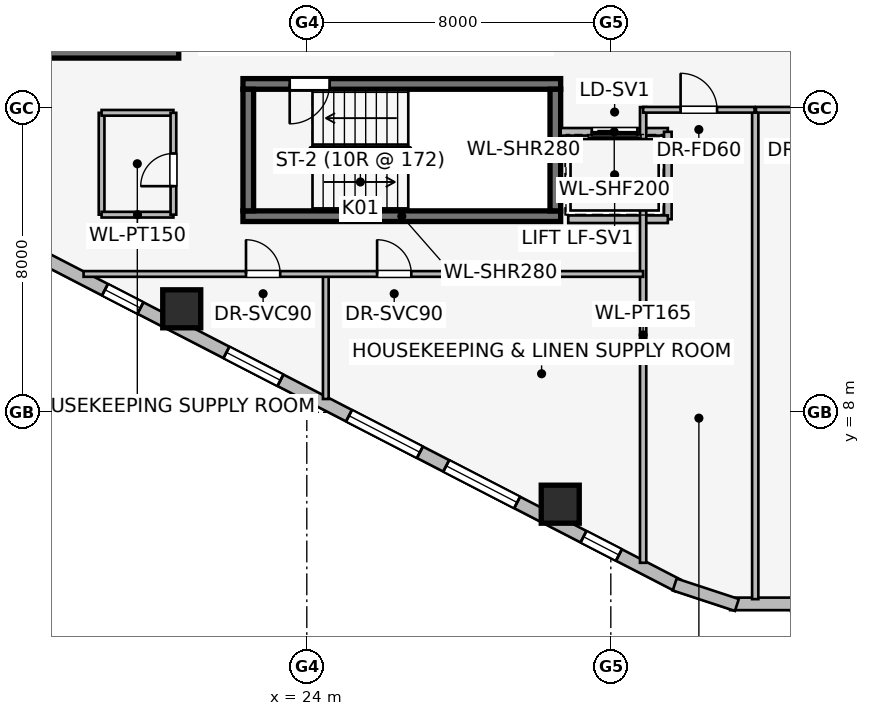
"""IFC4 building model, lengths in metres.
Left out: names, types, materials, properties, quantities, classifications, styles, units other than length and angle.
Written with IfcOpenShell. Run it as: python <this file> out.ifc"""

import sys

from ifc_helpers import new_model, si_unit, direction, frame, frame_2d, origin, origin_2d, place, context, subcontext, project, spatial, rectangle, extrude, element, fill, save


model = new_model("IFC4")
c1 = context("Model", 3, precision=1e-05, world=origin(), true_north=direction((0.0, 1.0)))
c2 = subcontext(c1, "Body", "Model", "MODEL_VIEW")
j1 = project(units=[si_unit("LENGTHUNIT", "METRE"), si_unit("PLANEANGLEUNIT", "RADIAN")], contexts=[c1])
p1 = place(None, origin())
s1 = spatial("IfcSite", under=j1, at=p1, CompositionType="ELEMENT")
p2 = place(p1, origin())
s2 = spatial("IfcBuilding", under=s1, at=p2, CompositionType="ELEMENT")
p3 = place(p2, frame((0.0, 0.0, 142.95)))
s3 = spatial("IfcBuildingStorey", under=s2, at=p3, CompositionType="ELEMENT", Elevation=142.95)
p4 = place(p3, frame((16.87, 17.46, 0.0), z_axis=(0.0, 0.0, 1.0), x_axis=(1.0, 0.0, 0.0)))
e1 = element("IfcWall", 1, at=p4, inside=s3, PredefinedType="SHEAR", context=c2, shape_type="SweptSolid", body=[
    extrude(rectangle(XDim=3.76, YDim=0.28, at=frame_2d((1.88, 0.0))), origin(), (0.0, 0.0, 1.0), 3.45),
])
p5 = place(p3, frame((22.32, 13.16, 0.0), z_axis=(0.0, 0.0, 1.0), x_axis=(1.0, 0.0, 0.0)))
e2 = element("IfcWall", 2, at=p5, inside=s3, PredefinedType="SHEAR", context=c2, shape_type="SweptSolid", body=[
    extrude(rectangle(XDim=8.36, YDim=0.28, at=frame_2d((4.18, 0.0))), origin(), (0.0, 0.0, 1.0), 3.45),
])
p6 = place(p3, frame((30.68, 16.64, 0.0), z_axis=(0.0, 0.0, 1.0), x_axis=(-1.0, 0.0, 0.0)))
e3 = element("IfcWall", 3, at=p6, inside=s3, PredefinedType="SHEAR", context=c2, shape_type="SweptSolid", body=[
    extrude(rectangle(XDim=8.36, YDim=0.28, at=frame_2d((4.18, 0.0))), origin(), (0.0, 0.0, 1.0), 3.45),
])
p7 = place(p6, frame((6.08, 0.0, 0.0)))
e4 = element("IfcOpeningElement", 4, at=p7, cuts=e3, PredefinedType="OPENING", context=c2, shape_type="SweptSolid", body=[
    extrude(rectangle(XDim=1.05, YDim=2.0, at=frame_2d((0.525, 1.0))), frame((0.0, 0.15, 0.0), z_axis=(0.0, -1.0, 0.0), x_axis=(1.0, 0.0, 0.0)), (0.0, 0.0, 1.0), 0.3),
])
for number, where, z_axis, x_axis in (
    (5, (22.46, 16.5, 0.0), (0.0, 0.0, 1.0), (0.0, -1.0, 0.0)),
    (6, (30.54, 13.3, 0.0), (0.0, 0.0, 1.0), (0.0, 1.0, 0.0)),
):
    element("IfcWall", number, at=place(p3, frame(where, z_axis=z_axis, x_axis=x_axis)), inside=s3, PredefinedType="SHEAR", context=c2, shape_type="SweptSolid", body=[
        extrude(rectangle(XDim=3.2, YDim=0.28, at=frame_2d((1.6, 0.0))), origin(), (0.0, 0.0, 1.0), 3.45),
    ])
for number, where, z_axis, x_axis in (
    (7, (20.709, 10.723, 0.0), (0.0, 0.0, 1.0), (1.0, 0.0, 0.0)),
    (8, (30.669, 5.582, 0.0), (0.0, 0.0, 1.0), (1.0, 0.0, 0.0)),
):
    element("IfcColumn", number, at=place(p3, frame(where, z_axis=z_axis, x_axis=x_axis)), inside=s3, PredefinedType="COLUMN", context=c2, shape_type="SweptSolid", body=[
        extrude(rectangle(XDim=1.0, YDim=1.0, at=origin_2d()), origin(), (0.0, 0.0, 1.0), 3.45),
    ])
p8 = place(p3, frame((17.243, 11.95, 0.0), z_axis=(0.0, 0.0, 1.0), x_axis=(-0.790621329885, 0.612305408053, 0.0)))
e9 = element("IfcWall", 9, at=p8, inside=s3, PredefinedType="STANDARD", context=c2, shape_type="SweptSolid", body=[
    extrude(rectangle(XDim=1.676, YDim=0.33, at=frame_2d((0.838, 0.0))), origin(), (0.0, 0.0, 1.0), 3.16),
])
p9 = place(p3, frame((33.769, 3.442, 0.0), z_axis=(0.0, 0.0, 1.0), x_axis=(-0.888613612362, 0.458656568606, 0.0)))
e10 = element("IfcWall", 10, at=p9, inside=s3, PredefinedType="STANDARD", context=c2, shape_type="SweptSolid", body=[
    extrude(rectangle(XDim=18.681, YDim=0.34, at=frame_2d((9.34, 0.0))), origin(), (0.0, 0.0, 1.0), 3.16),
])
p10 = place(p9, frame((1.75, 0.0, 0.75)))
e11 = element("IfcOpeningElement", 11, at=p10, cuts=e10, PredefinedType="OPENING", context=c2, shape_type="SweptSolid", body=[
    extrude(rectangle(XDim=1.05, YDim=1.4, at=frame_2d((0.525, 0.7))), frame((0.0, 0.18, 0.0), z_axis=(0.0, -1.0, 0.0), x_axis=(1.0, 0.0, 0.0)), (0.0, 0.0, 1.0), 0.36),
])
p11 = place(p9, frame((4.765, 0.0, 0.75)))
e12 = element("IfcOpeningElement", 12, at=p11, cuts=e10, PredefinedType="OPENING", context=c2, shape_type="SweptSolid", body=[
    extrude(rectangle(XDim=2.1, YDim=1.5, at=frame_2d((1.05, 0.75))), frame((0.0, 0.18, 0.0), z_axis=(0.0, -1.0, 0.0), x_axis=(1.0, 0.0, 0.0)), (0.0, 0.0, 1.0), 0.36),
])
p12 = place(p9, frame((7.644, 0.0, 0.75)))
e13 = element("IfcOpeningElement", 13, at=p12, cuts=e10, PredefinedType="OPENING", context=c2, shape_type="SweptSolid", body=[
    extrude(rectangle(XDim=2.1, YDim=1.5, at=frame_2d((1.05, 0.75))), frame((0.0, 0.18, 0.0), z_axis=(0.0, -1.0, 0.0), x_axis=(1.0, 0.0, 0.0)), (0.0, 0.0, 1.0), 0.36),
])
p13 = place(p9, frame((11.774, 0.0, 0.75)))
e14 = element("IfcOpeningElement", 14, at=p13, cuts=e10, PredefinedType="OPENING", context=c2, shape_type="SweptSolid", body=[
    extrude(rectangle(XDim=1.6, YDim=1.55, at=frame_2d((0.8, 0.775))), frame((0.0, 0.18, 0.0), z_axis=(0.0, -1.0, 0.0), x_axis=(1.0, 0.0, 0.0)), (0.0, 0.0, 1.0), 0.36),
])
p14 = place(p9, frame((15.92, 0.0, 0.75)))
e15 = element("IfcOpeningElement", 15, at=p14, cuts=e10, PredefinedType="OPENING", context=c2, shape_type="SweptSolid", body=[
    extrude(rectangle(XDim=1.05, YDim=1.4, at=frame_2d((0.525, 0.7))), frame((0.0, 0.18, 0.0), z_axis=(0.0, -1.0, 0.0), x_axis=(1.0, 0.0, 0.0)), (0.0, 0.0, 1.0), 0.36),
])
for number, where, z_axis, x_axis in (
    (16, (38.319, 3.468, 0.0), (0.0, 0.0, 1.0), (-0.95, -0.312, 0.0)),
    (17, (36.861, 2.959, 0.0), (0.0, 0.0, 1.0), (-1.0, 0.0, 0.0)),
    (18, (35.317, 2.93, 0.0), (0.0, 0.0, 1.0), (-0.95, 0.312, 0.0)),
):
    element("IfcWall", number, at=place(p3, frame(where, z_axis=z_axis, x_axis=x_axis)), inside=s3, PredefinedType="STANDARD", context=c2, shape_type="SweptSolid", body=[
        extrude(rectangle(XDim=1.722, YDim=0.33, at=frame_2d((0.861, 0.0))), origin(), (0.0, 0.0, 1.0), 3.16),
    ])
p15 = place(p3, frame((33.5, 15.38, 0.0), z_axis=(0.0, 0.0, 1.0), x_axis=(-1.0, 0.0, 0.0)))
e19 = element("IfcWall", 19, at=p15, inside=s3, PredefinedType="PARTITIONING", context=c2, shape_type="SweptSolid", body=[
    extrude(rectangle(XDim=2.82, YDim=0.2, at=frame_2d((1.41, 0.0))), origin(), (0.0, 0.0, 1.0), 3.16),
])
p16 = place(p15, frame((0.8, 0.0, 0.0)))
e20 = element("IfcOpeningElement", 20, at=p16, cuts=e19, PredefinedType="OPENING", context=c2, shape_type="SweptSolid", body=[
    extrude(rectangle(XDim=1.2, YDim=2.2, at=frame_2d((0.6, 1.1))), frame((0.0, 0.11, 0.0), z_axis=(0.0, -1.0, 0.0), x_axis=(1.0, 0.0, 0.0)), (0.0, 0.0, 1.0), 0.22),
])
p17 = place(p3, frame((33.5, 13.08, 0.0), z_axis=(0.0, 0.0, 1.0), x_axis=(0.0, 1.0, 0.0)))
e21 = element("IfcWall", 21, at=p17, inside=s3, PredefinedType="PARTITIONING", context=c2, shape_type="SweptSolid", body=[
    extrude(rectangle(XDim=2.3, YDim=0.2, at=frame_2d((1.15, 0.0))), origin(), (0.0, 0.0, 1.0), 3.16),
])
p18 = place(p3, frame((30.879, 13.08, 0.0), z_axis=(0.0, 0.0, 1.0), x_axis=(1.0, 0.0, 0.0)))
e22 = element("IfcWall", 22, at=p18, inside=s3, PredefinedType="PARTITIONING", context=c2, shape_type="SweptSolid", body=[
    extrude(rectangle(XDim=2.621, YDim=0.2, at=frame_2d((1.311, 0.0))), origin(), (0.0, 0.0, 1.0), 3.16),
])
p19 = place(p3, frame((18.6, 15.88, 0.0), z_axis=(0.0, 0.0, 1.0), x_axis=(0.0, -1.0, 0.0)))
e23 = element("IfcWall", 23, at=p19, inside=s3, PredefinedType="PARTITIONING", context=c2, shape_type="SweptSolid", body=[
    extrude(rectangle(XDim=2.68, YDim=0.15, at=frame_2d((1.34, 0.0))), origin(), (0.0, 0.0, 1.0), 3.16),
])
for number, where, z_axis, x_axis in (
    (24, (18.6, 13.2, 0.0), (0.0, 0.0, 1.0), (1.0, 0.0, 0.0)),
    (25, (18.6, 15.88, 0.0), (0.0, 0.0, 1.0), (1.0, 0.0, 0.0)),
):
    element("IfcWall", number, at=place(p3, frame(where, z_axis=z_axis, x_axis=x_axis)), inside=s3, PredefinedType="PARTITIONING", context=c2, shape_type="SweptSolid", body=[
        extrude(rectangle(XDim=1.89, YDim=0.15, at=frame_2d((0.945, 0.0))), origin(), (0.0, 0.0, 1.0), 3.16),
    ])
p20 = place(p3, frame((20.49, 13.2, 0.0), z_axis=(0.0, 0.0, 1.0), x_axis=(0.0, 1.0, 0.0)))
e26 = element("IfcWall", 26, at=p20, inside=s3, PredefinedType="PARTITIONING", context=c2, shape_type="SweptSolid", body=[
    extrude(rectangle(XDim=2.68, YDim=0.15, at=frame_2d((1.34, 0.0))), origin(), (0.0, 0.0, 1.0), 3.16),
])
p21 = place(p20, frame((0.75, 0.0, 0.0)))
e27 = element("IfcOpeningElement", 27, at=p21, cuts=e26, PredefinedType="OPENING", context=c2, shape_type="SweptSolid", body=[
    extrude(rectangle(XDim=0.86, YDim=2.0, at=frame_2d((0.43, 1.0))), frame((0.0, 0.085, 0.0), z_axis=(0.0, -1.0, 0.0), x_axis=(1.0, 0.0, 0.0)), (0.0, 0.0, 1.0), 0.17),
])
p22 = place(p3, frame((32.85, 4.04, 0.0), z_axis=(0.0, 0.0, 1.0), x_axis=(0.0, 1.0, 0.0)))
e28 = element("IfcWall", 28, at=p22, inside=s3, PredefinedType="PARTITIONING", context=c2, shape_type="SweptSolid", body=[
    extrude(rectangle(XDim=11.99, YDim=0.165, at=frame_2d((5.995, 0.0))), origin(), (0.0, 0.0, 1.0), 3.16),
])
p23 = place(p3, frame((24.5, 8.35, 0.0), z_axis=(0.0, 0.0, 1.0), x_axis=(0.0, 1.0, 0.0)))
e29 = element("IfcWall", 29, at=p23, inside=s3, PredefinedType="PARTITIONING", context=c2, shape_type="SweptSolid", body=[
    extrude(rectangle(XDim=3.29, YDim=0.15, at=frame_2d((1.645, 0.0))), origin(), (0.0, 0.0, 1.0), 3.16),
])
p24 = place(p3, frame((18.126, 11.64, 0.0), z_axis=(0.0, 0.0, 1.0), x_axis=(1.0, 0.0, 0.0)))
e30 = element("IfcWall", 30, at=p24, inside=s3, PredefinedType="PARTITIONING", context=c2, shape_type="SweptSolid", body=[
    extrude(rectangle(XDim=14.724, YDim=0.15, at=frame_2d((7.362, 0.0))), origin(), (0.0, 0.0, 1.0), 3.16),
])
p25 = place(p24, frame((4.274, 0.0, 0.0)))
e31 = element("IfcOpeningElement", 31, at=p25, cuts=e30, PredefinedType="OPENING", context=c2, shape_type="SweptSolid", body=[
    extrude(rectangle(XDim=0.9, YDim=2.0, at=frame_2d((0.45, 1.0))), frame((0.0, 0.085, 0.0), z_axis=(0.0, -1.0, 0.0), x_axis=(1.0, 0.0, 0.0)), (0.0, 0.0, 1.0), 0.17),
])
p26 = place(p24, frame((7.724, 0.0, 0.0)))
e32 = element("IfcOpeningElement", 32, at=p26, cuts=e30, PredefinedType="OPENING", context=c2, shape_type="SweptSolid", body=[
    extrude(rectangle(XDim=0.9, YDim=2.0, at=frame_2d((0.45, 1.0))), frame((0.0, 0.085, 0.0), z_axis=(0.0, -1.0, 0.0), x_axis=(1.0, 0.0, 0.0)), (0.0, 0.0, 1.0), 0.17),
])
p27 = place(p3, frame((35.8, 3.084, 0.0), z_axis=(0.0, 0.0, 1.0), x_axis=(0.0, 1.0, 0.0)))
e33 = element("IfcWall", 33, at=p27, inside=s3, PredefinedType="PARTITIONING", context=c2, shape_type="SweptSolid", body=[
    extrude(rectangle(XDim=12.846, YDim=0.165, at=frame_2d((6.423, 0.0))), origin(), (0.0, 0.0, 1.0), 3.16),
])
p28 = place(p3, frame((32.85, 15.96, 0.0), z_axis=(0.0, 0.0, 1.0), x_axis=(1.0, 0.0, 0.0)))
e34 = element("IfcWall", 34, at=p28, inside=s3, PredefinedType="PARTITIONING", context=c2, shape_type="SweptSolid", body=[
    extrude(rectangle(XDim=2.932, YDim=0.15, at=frame_2d((1.466, 0.0))), origin(), (0.0, 0.0, 1.0), 3.16),
])
p29 = place(p28, frame((0.986, 0.0, 0.0)))
e35 = element("IfcOpeningElement", 35, at=p29, cuts=e34, PredefinedType="OPENING", context=c2, shape_type="SweptSolid", body=[
    extrude(rectangle(XDim=0.96, YDim=2.0, at=frame_2d((0.48, 1.0))), frame((0.0, 0.085, 0.0), z_axis=(0.0, -1.0, 0.0), x_axis=(1.0, 0.0, 0.0)), (0.0, 0.0, 1.0), 0.17),
])
p30 = place(p3, frame((35.818, 15.96, 0.0), z_axis=(0.0, 0.0, 1.0), x_axis=(1.0, 0.0, 0.0)))
e36 = element("IfcWall", 36, at=p30, inside=s3, PredefinedType="PARTITIONING", context=c2, shape_type="SweptSolid", body=[
    extrude(rectangle(XDim=2.844, YDim=0.15, at=frame_2d((1.422, 0.0))), origin(), (0.0, 0.0, 1.0), 3.16),
])
p31 = place(p30, frame((0.942, 0.0, 0.0)))
e37 = element("IfcOpeningElement", 37, at=p31, cuts=e36, PredefinedType="OPENING", context=c2, shape_type="SweptSolid", body=[
    extrude(rectangle(XDim=0.96, YDim=2.0, at=frame_2d((0.48, 1.0))), frame((0.0, 0.085, 0.0), z_axis=(0.0, -1.0, 0.0), x_axis=(1.0, 0.0, 0.0)), (0.0, 0.0, 1.0), 0.17),
])
p32 = place(p10, origin())
e38 = element("IfcWindow", 38, at=p32, inside=s3, PartitioningType="SINGLE_PANEL", PredefinedType="WINDOW", context=c2, shape_type="SweptSolid", body=[
    extrude(rectangle(XDim=1.05, YDim=1.4, at=frame_2d((0.525, 0.7))), frame((0.0, 0.03, 0.0), z_axis=(0.0, -1.0, 0.0), x_axis=(1.0, 0.0, 0.0)), (0.0, 0.0, 1.0), 0.06),
])
fill(e11, e38)
p33 = place(p11, origin())
e39 = element("IfcWindow", 39, at=p33, inside=s3, PartitioningType="SINGLE_PANEL", PredefinedType="WINDOW", context=c2, shape_type="SweptSolid", body=[
    extrude(rectangle(XDim=2.1, YDim=1.5, at=frame_2d((1.05, 0.75))), frame((0.0, 0.03, 0.0), z_axis=(0.0, -1.0, 0.0), x_axis=(1.0, 0.0, 0.0)), (0.0, 0.0, 1.0), 0.06),
])
fill(e12, e39)
p34 = place(p12, origin())
e40 = element("IfcWindow", 40, at=p34, inside=s3, PartitioningType="SINGLE_PANEL", PredefinedType="WINDOW", context=c2, shape_type="SweptSolid", body=[
    extrude(rectangle(XDim=2.1, YDim=1.5, at=frame_2d((1.05, 0.75))), frame((0.0, 0.03, 0.0), z_axis=(0.0, -1.0, 0.0), x_axis=(1.0, 0.0, 0.0)), (0.0, 0.0, 1.0), 0.06),
])
fill(e13, e40)
p35 = place(p13, origin())
e41 = element("IfcWindow", 41, at=p35, inside=s3, PartitioningType="SINGLE_PANEL", PredefinedType="WINDOW", context=c2, shape_type="SweptSolid", body=[
    extrude(rectangle(XDim=1.6, YDim=1.55, at=frame_2d((0.8, 0.775))), frame((0.0, 0.03, 0.0), z_axis=(0.0, -1.0, 0.0), x_axis=(1.0, 0.0, 0.0)), (0.0, 0.0, 1.0), 0.06),
])
fill(e14, e41)
p36 = place(p14, origin())
e42 = element("IfcWindow", 42, at=p36, inside=s3, PartitioningType="SINGLE_PANEL", PredefinedType="WINDOW", context=c2, shape_type="SweptSolid", body=[
    extrude(rectangle(XDim=1.05, YDim=1.4, at=frame_2d((0.525, 0.7))), frame((0.0, 0.03, 0.0), z_axis=(0.0, -1.0, 0.0), x_axis=(1.0, 0.0, 0.0)), (0.0, 0.0, 1.0), 0.06),
])
fill(e15, e42)
p37 = place(p7, origin())
e43 = element("IfcDoor", 43, at=p37, inside=s3, OperationType="SINGLE_SWING_RIGHT", PredefinedType="DOOR", context=c2, shape_type="SweptSolid", body=[
    extrude(rectangle(XDim=1.05, YDim=2.0, at=frame_2d((0.525, 1.0))), frame((0.0, 0.025, 0.0), z_axis=(0.0, -1.0, 0.0), x_axis=(1.0, 0.0, 0.0)), (0.0, 0.0, 1.0), 0.05),
])
fill(e4, e43)
p38 = place(p16, origin())
e44 = element("IfcDoor", 44, at=p38, inside=s3, OperationType="SLIDING_TO_RIGHT", PredefinedType="DOOR", context=c2, shape_type="SweptSolid", body=[
    extrude(rectangle(XDim=1.2, YDim=2.2, at=frame_2d((0.6, 1.1))), frame((0.0, 0.025, 0.0), z_axis=(0.0, -1.0, 0.0), x_axis=(1.0, 0.0, 0.0)), (0.0, 0.0, 1.0), 0.05),
])
fill(e20, e44)
p39 = place(p21, origin())
e45 = element("IfcDoor", 45, at=p39, inside=s3, OperationType="SINGLE_SWING_LEFT", PredefinedType="DOOR", context=c2, shape_type="SweptSolid", body=[
    extrude(rectangle(XDim=0.86, YDim=2.0, at=frame_2d((0.43, 1.0))), frame((0.0, 0.025, 0.0), z_axis=(0.0, -1.0, 0.0), x_axis=(1.0, 0.0, 0.0)), (0.0, 0.0, 1.0), 0.05),
])
fill(e27, e45)
p40 = place(p25, origin())
e46 = element("IfcDoor", 46, at=p40, inside=s3, OperationType="SINGLE_SWING_LEFT", PredefinedType="DOOR", context=c2, shape_type="SweptSolid", body=[
    extrude(rectangle(XDim=0.9, YDim=2.0, at=frame_2d((0.45, 1.0))), frame((0.0, 0.025, 0.0), z_axis=(0.0, -1.0, 0.0), x_axis=(1.0, 0.0, 0.0)), (0.0, 0.0, 1.0), 0.05),
])
fill(e31, e46)
p41 = place(p26, origin())
e47 = element("IfcDoor", 47, at=p41, inside=s3, OperationType="SINGLE_SWING_LEFT", PredefinedType="DOOR", context=c2, shape_type="SweptSolid", body=[
    extrude(rectangle(XDim=0.9, YDim=2.0, at=frame_2d((0.45, 1.0))), frame((0.0, 0.025, 0.0), z_axis=(0.0, -1.0, 0.0), x_axis=(1.0, 0.0, 0.0)), (0.0, 0.0, 1.0), 0.05),
])
fill(e32, e47)
p42 = place(p29, origin())
e48 = element("IfcDoor", 48, at=p42, inside=s3, OperationType="SINGLE_SWING_LEFT", PredefinedType="DOOR", context=c2, shape_type="SweptSolid", body=[
    extrude(rectangle(XDim=0.96, YDim=2.0, at=frame_2d((0.48, 1.0))), frame((0.0, 0.025, 0.0), z_axis=(0.0, -1.0, 0.0), x_axis=(1.0, 0.0, 0.0)), (0.0, 0.0, 1.0), 0.05),
])
fill(e35, e48)
save(model, sys.argv[1])
